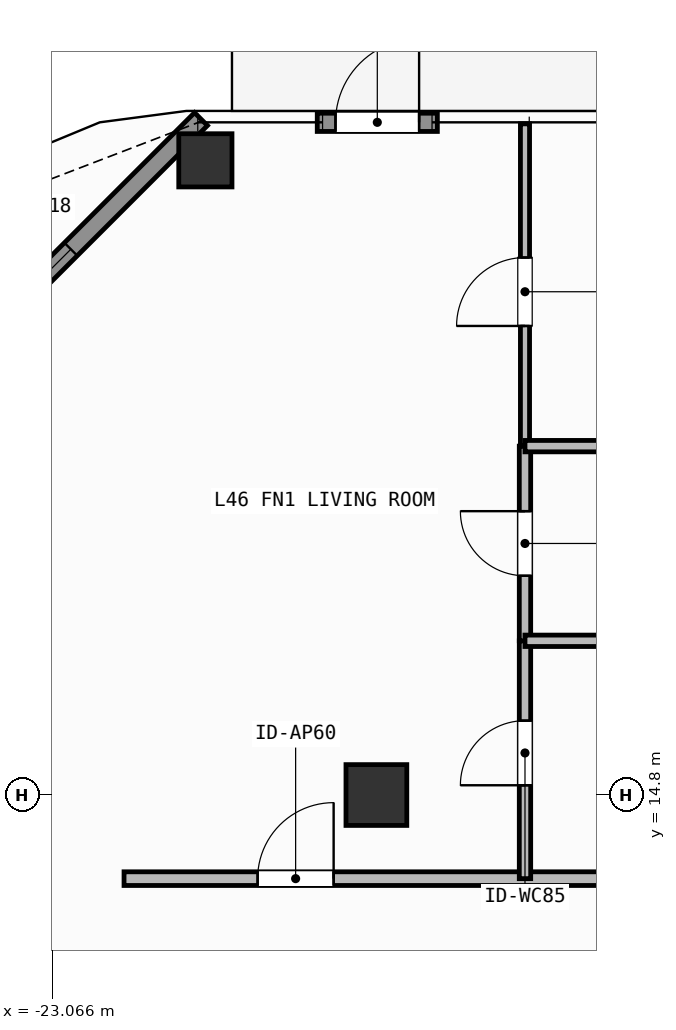
"""IFC4 building model, lengths in metres.
Left out: names, types, materials, properties, quantities, classifications, styles, units other than length and angle.
Written with IfcOpenShell. Run it as: python <this file> out.ifc"""

import sys

from ifc_helpers import new_model, si_unit, direction, frame, frame_2d, origin, origin_2d, place, context, subcontext, project, spatial, rectangle, hollow_rectangle, extrude, element, fill, save


model = new_model("IFC4")
c1 = context("Model", 3, precision=1e-05, world=origin(), true_north=direction((0.0, 1.0)))
c2 = subcontext(c1, "Body", "Model", "MODEL_VIEW")
j1 = project(units=[si_unit("LENGTHUNIT", "METRE"), si_unit("PLANEANGLEUNIT", "RADIAN")], contexts=[c1])
p1 = place(None, origin())
s1 = spatial("IfcSite", under=j1, at=p1, CompositionType="ELEMENT")
p2 = place(p1, origin())
s2 = spatial("IfcBuilding", under=s1, at=p2, CompositionType="ELEMENT")
p3 = place(p2, frame((0.0, 0.0, 187.5)))
s3 = spatial("IfcBuildingStorey", under=s2, at=p3, CompositionType="ELEMENT", Elevation=187.5)
p4 = place(p3, frame((-18.8, 14.8, 0.0), z_axis=(0.0, 0.0, 1.0), x_axis=(1.0, 0.0, 0.0)))
e1 = element("IfcColumn", 1, at=p4, inside=s3, PredefinedType="COLUMN", context=c2, shape_type="SweptSolid", body=[
    extrude(hollow_rectangle(XDim=0.8, YDim=0.8, WallThickness=0.036, at=origin_2d()), origin(), (0.0, 0.0, 1.0), 3.9),
])
p5 = place(p3, frame((-21.05, 23.15, 0.0), z_axis=(0.0, 0.0, 1.0), x_axis=(1.0, 0.0, 0.0)))
e2 = element("IfcColumn", 2, at=p5, inside=s3, PredefinedType="COLUMN", context=c2, shape_type="SweptSolid", body=[
    extrude(hollow_rectangle(XDim=0.7, YDim=0.7, WallThickness=0.032, at=origin_2d()), origin(), (0.0, 0.0, 1.0), 3.9),
])
p6 = place(p3, frame((-19.578, 23.65, 0.0), z_axis=(0.0, 0.0, 1.0), x_axis=(1.0, 0.0, 0.0)))
e3 = element("IfcWall", 3, at=p6, inside=s3, PredefinedType="SOLIDWALL", context=c2, shape_type="SweptSolid", body=[
    extrude(rectangle(XDim=1.58, YDim=0.24, at=frame_2d((0.79, 0.0))), origin(), (0.0, 0.0, 1.0), 3.62),
])
p7 = place(p6, frame((0.24, 0.0, 0.0)))
e4 = element("IfcOpeningElement", 4, at=p7, cuts=e3, PredefinedType="OPENING", context=c2, shape_type="SweptSolid", body=[
    extrude(rectangle(XDim=1.1, YDim=2.2, at=frame_2d((0.55, 1.1))), frame((0.0, 0.13, 0.0), z_axis=(0.0, -1.0, 0.0), x_axis=(1.0, 0.0, 0.0)), (0.0, 0.0, 1.0), 0.26),
])
p8 = place(p3, frame((-25.592, 19.208, 0.0), z_axis=(0.0, 0.0, 1.0), x_axis=(0.707087534163, 0.707126027686, 0.0)))
e5 = element("IfcWall", 5, at=p8, inside=s3, PredefinedType="SOLIDWALL", context=c2, shape_type="SweptSolid", body=[
    extrude(rectangle(XDim=6.342, YDim=0.24, at=frame_2d((3.171, 0.0))), origin(), (0.0, 0.0, 1.0), 3.62),
])
p9 = place(p8, frame((2.421, 0.0, 0.8)))
e6 = element("IfcOpeningElement", 6, at=p9, cuts=e5, PredefinedType="OPENING", context=c2, shape_type="SweptSolid", body=[
    extrude(rectangle(XDim=1.5, YDim=1.85, at=frame_2d((0.75, 0.925))), frame((0.0, 0.13, 0.0), z_axis=(0.0, -1.0, 0.0), x_axis=(1.0, 0.0, 0.0)), (0.0, 0.0, 1.0), 0.26),
])
p10 = place(p3, frame((-22.12, 13.7, 0.0), z_axis=(0.0, 0.0, 1.0), x_axis=(1.0, 0.0, 0.0)))
e7 = element("IfcWall", 7, at=p10, inside=s3, PredefinedType="PARTITIONING", context=c2, shape_type="SweptSolid", body=[
    extrude(rectangle(XDim=9.84, YDim=0.18, at=frame_2d((4.92, 0.0))), origin(), (0.0, 0.0, 1.0), 3.62),
])
p11 = place(p10, frame((1.758, 0.0, 0.0)))
e8 = element("IfcOpeningElement", 8, at=p11, cuts=e7, PredefinedType="OPENING", context=c2, shape_type="SweptSolid", body=[
    extrude(rectangle(XDim=1.0, YDim=2.2, at=frame_2d((0.5, 1.1))), frame((0.0, 0.1, 0.0), z_axis=(0.0, -1.0, 0.0), x_axis=(1.0, 0.0, 0.0)), (0.0, 0.0, 1.0), 0.2),
])
p12 = place(p3, frame((-16.845, 13.7, 0.0), z_axis=(0.0, 0.0, 1.0), x_axis=(0.0, 1.0, 0.0)))
e9 = element("IfcWall", 9, at=p12, inside=s3, PredefinedType="PARTITIONING", context=c2, shape_type="SweptSolid", body=[
    extrude(rectangle(XDim=3.129, YDim=0.15, at=frame_2d((1.564, 0.0))), origin(), (0.0, 0.0, 1.0), 3.62),
])
p13 = place(p12, frame((1.229, 0.0, 0.0)))
e10 = element("IfcOpeningElement", 10, at=p13, cuts=e9, PredefinedType="OPENING", context=c2, shape_type="SweptSolid", body=[
    extrude(rectangle(XDim=0.85, YDim=2.1, at=frame_2d((0.425, 1.05))), frame((0.0, 0.085, 0.0), z_axis=(0.0, -1.0, 0.0), x_axis=(1.0, 0.0, 0.0)), (0.0, 0.0, 1.0), 0.17),
])
p14 = place(p3, frame((-16.845, 16.829, 0.0), z_axis=(0.0, 0.0, 1.0), x_axis=(0.0, 1.0, 0.0)))
e11 = element("IfcWall", 11, at=p14, inside=s3, PredefinedType="PARTITIONING", context=c2, shape_type="SweptSolid", body=[
    extrude(rectangle(XDim=2.561, YDim=0.15, at=frame_2d((1.28, 0.0))), origin(), (0.0, 0.0, 1.0), 3.62),
])
p15 = place(p14, frame((0.855, 0.0, 0.0)))
e12 = element("IfcOpeningElement", 12, at=p15, cuts=e11, PredefinedType="OPENING", context=c2, shape_type="SweptSolid", body=[
    extrude(rectangle(XDim=0.85, YDim=2.1, at=frame_2d((0.425, 1.05))), frame((0.0, 0.085, 0.0), z_axis=(0.0, -1.0, 0.0), x_axis=(1.0, 0.0, 0.0)), (0.0, 0.0, 1.0), 0.17),
])
p16 = place(p3, frame((-16.845, 19.39, 0.0), z_axis=(0.0, 0.0, 1.0), x_axis=(0.0, 1.0, 0.0)))
e13 = element("IfcWall", 13, at=p16, inside=s3, PredefinedType="PARTITIONING", context=c2, shape_type="SweptSolid", body=[
    extrude(rectangle(XDim=4.24, YDim=0.12, at=frame_2d((2.12, 0.0))), origin(), (0.0, 0.0, 1.0), 3.62),
])
p17 = place(p16, frame((1.581, 0.0, 0.0)))
e14 = element("IfcOpeningElement", 14, at=p17, cuts=e13, PredefinedType="OPENING", context=c2, shape_type="SweptSolid", body=[
    extrude(rectangle(XDim=0.9, YDim=2.1, at=frame_2d((0.45, 1.05))), frame((0.0, 0.07, 0.0), z_axis=(0.0, -1.0, 0.0), x_axis=(1.0, 0.0, 0.0)), (0.0, 0.0, 1.0), 0.14),
])
for number, where, z_axis, x_axis in (
    (15, (-16.845, 16.829, 0.0), (0.0, 0.0, 1.0), (1.0, 0.0, 0.0)),
    (16, (-16.845, 19.39, 0.0), (0.0, 0.0, 1.0), (1.0, 0.0, 0.0)),
):
    element("IfcWall", number, at=place(p3, frame(where, z_axis=z_axis, x_axis=x_axis)), inside=s3, PredefinedType="PARTITIONING", context=c2, shape_type="SweptSolid", body=[
        extrude(rectangle(XDim=4.565, YDim=0.15, at=frame_2d((2.282, 0.0))), origin(), (0.0, 0.0, 1.0), 3.62),
    ])
p18 = place(p7, origin())
e17 = element("IfcDoor", 17, at=p18, inside=s3, OperationType="SINGLE_SWING_RIGHT", PredefinedType="DOOR", context=c2, shape_type="SweptSolid", body=[
    extrude(rectangle(XDim=1.1, YDim=2.2, at=frame_2d((0.55, 1.1))), frame((0.0, 0.025, 0.0), z_axis=(0.0, -1.0, 0.0), x_axis=(1.0, 0.0, 0.0)), (0.0, 0.0, 1.0), 0.05),
])
fill(e4, e17)
p19 = place(p9, origin())
e18 = element("IfcWindow", 18, at=p19, inside=s3, PartitioningType="SINGLE_PANEL", PredefinedType="WINDOW", context=c2, shape_type="SweptSolid", body=[
    extrude(rectangle(XDim=1.5, YDim=1.85, at=frame_2d((0.75, 0.925))), frame((0.0, 0.03, 0.0), z_axis=(0.0, -1.0, 0.0), x_axis=(1.0, 0.0, 0.0)), (0.0, 0.0, 1.0), 0.06),
])
fill(e6, e18)
p20 = place(p11, origin())
e19 = element("IfcDoor", 19, at=p20, inside=s3, OperationType="SINGLE_SWING_RIGHT", PredefinedType="DOOR", context=c2, shape_type="SweptSolid", body=[
    extrude(rectangle(XDim=1.0, YDim=2.2, at=frame_2d((0.5, 1.1))), frame((0.0, 0.025, 0.0), z_axis=(0.0, -1.0, 0.0), x_axis=(1.0, 0.0, 0.0)), (0.0, 0.0, 1.0), 0.05),
])
fill(e8, e19)
p21 = place(p13, origin())
e20 = element("IfcDoor", 20, at=p21, inside=s3, OperationType="SINGLE_SWING_LEFT", PredefinedType="DOOR", context=c2, shape_type="SweptSolid", body=[
    extrude(rectangle(XDim=0.85, YDim=2.1, at=frame_2d((0.425, 1.05))), frame((0.0, 0.025, 0.0), z_axis=(0.0, -1.0, 0.0), x_axis=(1.0, 0.0, 0.0)), (0.0, 0.0, 1.0), 0.05),
])
fill(e10, e20)
p22 = place(p15, origin())
e21 = element("IfcDoor", 21, at=p22, inside=s3, OperationType="SINGLE_SWING_RIGHT", PredefinedType="DOOR", context=c2, shape_type="SweptSolid", body=[
    extrude(rectangle(XDim=0.85, YDim=2.1, at=frame_2d((0.425, 1.05))), frame((0.0, 0.025, 0.0), z_axis=(0.0, -1.0, 0.0), x_axis=(1.0, 0.0, 0.0)), (0.0, 0.0, 1.0), 0.05),
])
fill(e12, e21)
p23 = place(p17, origin())
e22 = element("IfcDoor", 22, at=p23, inside=s3, OperationType="SINGLE_SWING_LEFT", PredefinedType="DOOR", context=c2, shape_type="SweptSolid", body=[
    extrude(rectangle(XDim=0.9, YDim=2.1, at=frame_2d((0.45, 1.05))), frame((0.0, 0.025, 0.0), z_axis=(0.0, -1.0, 0.0), x_axis=(1.0, 0.0, 0.0)), (0.0, 0.0, 1.0), 0.05),
])
fill(e14, e22)
save(model, sys.argv[1])
